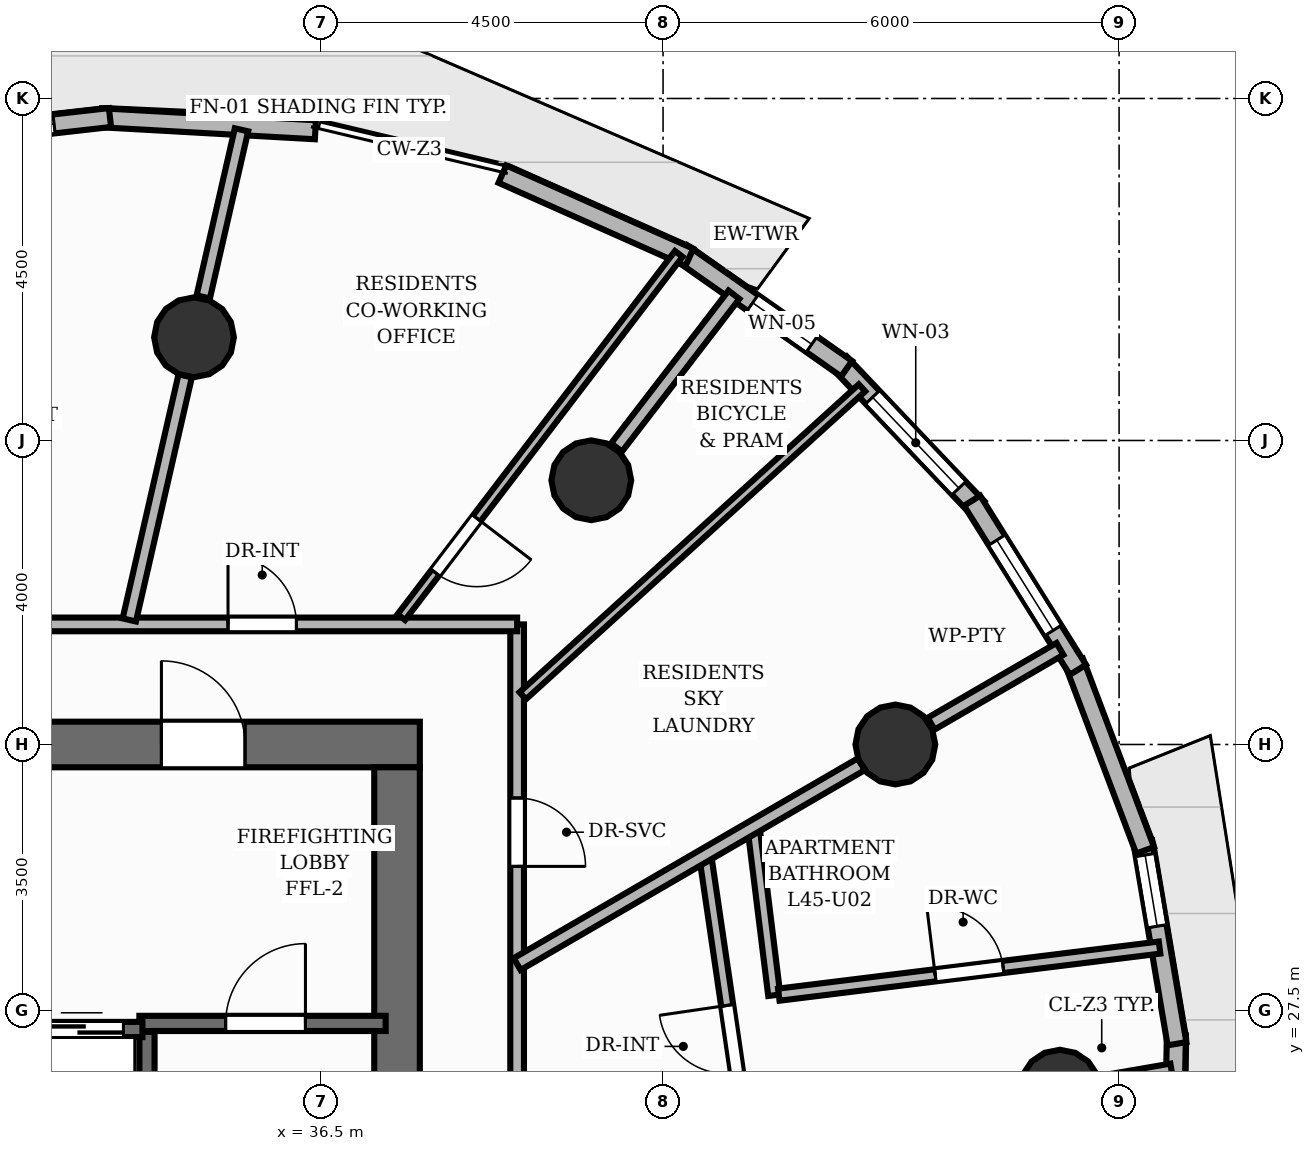
"""IFC4 building model, lengths in metres.
Left out: names, types, materials, properties, quantities, classifications, styles, units other than length and angle.
Written with IfcOpenShell. Run it as: python <this file> out.ifc"""

import sys

from ifc_helpers import new_model, si_unit, direction, frame, frame_2d, origin, origin_2d, place, context, subcontext, project, spatial, rectangle, circle, extrude, element, fill, save


model = new_model("IFC4")
c1 = context("Model", 3, precision=1e-05, world=origin(), true_north=direction((0.0, 1.0)))
c2 = subcontext(c1, "Body", "Model", "MODEL_VIEW")
j1 = project(units=[si_unit("LENGTHUNIT", "METRE"), si_unit("PLANEANGLEUNIT", "RADIAN")], contexts=[c1])
p1 = place(None, origin())
s1 = spatial("IfcSite", under=j1, at=p1, CompositionType="ELEMENT")
p2 = place(p1, origin())
s2 = spatial("IfcBuilding", under=s1, at=p2, CompositionType="ELEMENT")
p3 = place(p2, frame((0.0, 0.0, 152.16)))
s3 = spatial("IfcBuildingStorey", under=s2, at=p3, CompositionType="ELEMENT", Elevation=152.16)
p4 = place(p3, frame((22.7, 31.0, 0.0), z_axis=(0.0, 0.0, 1.0), x_axis=(1.0, 0.0, 0.0)))
e1 = element("IfcWall", 1, at=p4, inside=s3, PredefinedType="SHEAR", context=c2, shape_type="SweptSolid", body=[
    extrude(rectangle(XDim=15.1, YDim=0.6, at=frame_2d((7.55, 0.0))), origin(), (0.0, 0.0, 1.0), 3.2),
])
p5 = place(p4, frame((11.7, 0.0, 0.0)))
e2 = element("IfcOpeningElement", 2, at=p5, cuts=e1, PredefinedType="OPENING", context=c2, shape_type="SweptSolid", body=[
    extrude(rectangle(XDim=1.1, YDim=2.15, at=frame_2d((0.55, 1.075))), frame((0.0, 0.31, 0.0), z_axis=(0.0, -1.0, 0.0), x_axis=(1.0, 0.0, 0.0)), (0.0, 0.0, 1.0), 0.62),
])
p6 = place(p3, frame((37.5, 17.3, 0.0), z_axis=(0.0, 0.0, 1.0), x_axis=(0.0, 1.0, 0.0)))
e3 = element("IfcWall", 3, at=p6, inside=s3, PredefinedType="SHEAR", context=c2, shape_type="SweptSolid", body=[
    extrude(rectangle(XDim=13.4, YDim=0.6, at=frame_2d((6.7, 0.0))), origin(), (0.0, 0.0, 1.0), 3.2),
])
for number, where, z_axis, x_axis in (
    (4, (46.221, 26.458, 0.0), (0.0, 0.0, 1.0), (1.0, 0.0, 0.0)),
    (5, (44.056, 31.0, 0.0), (0.0, 0.0, 1.0), (1.0, 0.0, 0.0)),
    (6, (40.056, 34.477, 0.0), (0.0, 0.0, 1.0), (1.0, 0.0, 0.0)),
    (7, (34.829, 36.358, 0.0), (0.0, 0.0, 1.0), (1.0, 0.0, 0.0)),
):
    element("IfcColumn", number, at=place(p3, frame(where, z_axis=z_axis, x_axis=x_axis)), inside=s3, PredefinedType="COLUMN", context=c2, shape_type="SweptSolid", body=[
        extrude(circle(Radius=0.525, at=origin_2d()), origin(), (0.0, 0.0, 1.0), 3.2),
    ])
p7 = place(p3, frame((43.328, 36.019, 0.0), z_axis=(0.0, 0.0, 1.0), x_axis=(0.688923042016, -0.724834492957, 0.0)))
e8 = element("IfcWall", 8, at=p7, inside=s3, PredefinedType="SOLIDWALL", context=c2, shape_type="SweptSolid", body=[
    extrude(rectangle(XDim=2.624, YDim=0.25, at=frame_2d((1.312, 0.0))), origin(), (0.0, 0.0, 1.0), 2.96),
])
p8 = place(p7, frame((0.621, 0.0, 0.85)))
e9 = element("IfcOpeningElement", 9, at=p8, cuts=e8, PredefinedType="OPENING", context=c2, shape_type="SweptSolid", body=[
    extrude(rectangle(XDim=1.65, YDim=1.55, at=frame_2d((0.825, 0.775))), frame((0.0, 0.135, 0.0), z_axis=(0.0, -1.0, 0.0), x_axis=(1.0, 0.0, 0.0)), (0.0, 0.0, 1.0), 0.27),
])
p9 = place(p3, frame((41.247, 37.466, 0.0), z_axis=(0.0, 0.0, 1.0), x_axis=(0.818434239786, -0.574600204617, 0.0)))
e10 = element("IfcWall", 10, at=p9, inside=s3, PredefinedType="SOLIDWALL", context=c2, shape_type="SweptSolid", body=[
    extrude(rectangle(XDim=2.648, YDim=0.25, at=frame_2d((1.324, 0.0))), origin(), (0.0, 0.0, 1.0), 2.96),
])
p10 = place(p9, frame((1.138, 0.0, 0.85)))
e11 = element("IfcOpeningElement", 11, at=p10, cuts=e10, PredefinedType="OPENING", context=c2, shape_type="SweptSolid", body=[
    extrude(rectangle(XDim=0.95, YDim=1.45, at=frame_2d((0.475, 0.725))), frame((0.0, 0.135, 0.0), z_axis=(0.0, -1.0, 0.0), x_axis=(1.0, 0.0, 0.0)), (0.0, 0.0, 1.0), 0.27),
])
p11 = place(p3, frame((38.886, 38.505, 0.0), z_axis=(0.0, 0.0, 1.0), x_axis=(0.913598321014, -0.406617889228, 0.0)))
e12 = element("IfcWall", 12, at=p11, inside=s3, PredefinedType="SOLIDWALL", context=c2, shape_type="SweptSolid", body=[
    extrude(rectangle(XDim=2.693, YDim=0.25, at=frame_2d((1.346, 0.0))), origin(), (0.0, 0.0, 1.0), 2.96),
])
p12 = place(p3, frame((33.613, 39.246, 0.0), z_axis=(0.0, 0.0, 1.0), x_axis=(0.998436800423, -0.055892356906, 0.0)))
e13 = element("IfcWall", 13, at=p12, inside=s3, PredefinedType="SOLIDWALL", context=c2, shape_type="SweptSolid", body=[
    extrude(rectangle(XDim=2.817, YDim=0.25, at=frame_2d((1.409, 0.0))), origin(), (0.0, 0.0, 1.0), 2.96),
])
p13 = place(p3, frame((30.86, 38.924, 0.0), z_axis=(0.0, 0.0, 1.0), x_axis=(0.993631150985, 0.112681568111, 0.0)))
e14 = element("IfcWall", 14, at=p13, inside=s3, PredefinedType="SOLIDWALL", context=c2, shape_type="SweptSolid", body=[
    extrude(rectangle(XDim=2.882, YDim=0.25, at=frame_2d((1.441, 0.0))), origin(), (0.0, 0.0, 1.0), 2.96),
])
p14 = place(p13, frame((0.741, 0.0, 0.85)))
e15 = element("IfcOpeningElement", 15, at=p14, cuts=e14, PredefinedType="OPENING", context=c2, shape_type="SweptSolid", body=[
    extrude(rectangle(XDim=1.4, YDim=1.55, at=frame_2d((0.7, 0.775))), frame((0.0, 0.135, 0.0), z_axis=(0.0, -1.0, 0.0), x_axis=(1.0, 0.0, 0.0)), (0.0, 0.0, 1.0), 0.27),
])
p15 = place(p3, frame((47.753, 27.175, 0.0), z_axis=(0.0, 0.0, 1.0), x_axis=(-0.018273942119, -0.999833017578, 0.0)))
e16 = element("IfcWall", 16, at=p15, inside=s3, PredefinedType="SOLIDWALL", context=c2, shape_type="SweptSolid", body=[
    extrude(rectangle(XDim=2.752, YDim=0.25, at=frame_2d((1.376, 0.0))), origin(), (0.0, 0.0, 1.0), 2.96),
])
p16 = place(p3, frame((47.313, 29.718, 0.0), z_axis=(0.0, 0.0, 1.0), x_axis=(0.166721354457, -0.9860040517, 0.0)))
e17 = element("IfcWall", 17, at=p16, inside=s3, PredefinedType="SOLIDWALL", context=c2, shape_type="SweptSolid", body=[
    extrude(rectangle(XDim=2.693, YDim=0.25, at=frame_2d((1.346, 0.0))), origin(), (0.0, 0.0, 1.0), 2.96),
])
p17 = place(p16, frame((0.175, 0.0, 0.85)))
e18 = element("IfcOpeningElement", 18, at=p17, cuts=e17, PredefinedType="OPENING", context=c2, shape_type="SweptSolid", body=[
    extrude(rectangle(XDim=0.95, YDim=1.45, at=frame_2d((0.475, 0.725))), frame((0.0, 0.135, 0.0), z_axis=(0.0, -1.0, 0.0), x_axis=(1.0, 0.0, 0.0)), (0.0, 0.0, 1.0), 0.27),
])
p18 = place(p3, frame((46.408, 32.086, 0.0), z_axis=(0.0, 0.0, 1.0), x_axis=(0.353022229402, -0.93561493444, 0.0)))
e19 = element("IfcWall", 19, at=p18, inside=s3, PredefinedType="SOLIDWALL", context=c2, shape_type="SweptSolid", body=[
    extrude(rectangle(XDim=2.648, YDim=0.25, at=frame_2d((1.324, 0.0))), origin(), (0.0, 0.0, 1.0), 2.96),
])
p19 = place(p3, frame((45.066, 34.207, 0.0), z_axis=(0.0, 0.0, 1.0), x_axis=(0.530726374543, -0.847543223302, 0.0)))
e20 = element("IfcWall", 20, at=p19, inside=s3, PredefinedType="SOLIDWALL", context=c2, shape_type="SweptSolid", body=[
    extrude(rectangle(XDim=2.624, YDim=0.25, at=frame_2d((1.312, 0.0))), origin(), (0.0, 0.0, 1.0), 2.96),
])
p20 = place(p19, frame((0.612, 0.0, 0.85)))
e21 = element("IfcOpeningElement", 21, at=p20, cuts=e20, PredefinedType="OPENING", context=c2, shape_type="SweptSolid", body=[
    extrude(rectangle(XDim=1.4, YDim=1.45, at=frame_2d((0.7, 0.725))), frame((0.0, 0.135, 0.0), z_axis=(0.0, -1.0, 0.0), x_axis=(1.0, 0.0, 0.0)), (0.0, 0.0, 1.0), 0.27),
])
p21 = place(p3, frame((34.21, 20.78, 0.0), z_axis=(0.0, 0.0, 1.0), x_axis=(0.0, 1.0, 0.0)))
e22 = element("IfcWall", 22, at=p21, inside=s3, PredefinedType="SHEAR", context=c2, shape_type="SweptSolid", body=[
    extrude(rectangle(XDim=6.44, YDim=0.2, at=frame_2d((3.22, 0.0))), origin(), (0.0, 0.0, 1.0), 3.2),
])
p22 = place(p3, frame((34.11, 27.33, 0.0), z_axis=(0.0, 0.0, 1.0), x_axis=(1.0, 0.0, 0.0)))
e23 = element("IfcWall", 23, at=p22, inside=s3, PredefinedType="SHEAR", context=c2, shape_type="SweptSolid", body=[
    extrude(rectangle(XDim=3.24, YDim=0.2, at=frame_2d((1.62, 0.0))), origin(), (0.0, 0.0, 1.0), 3.2),
])
p23 = place(p22, frame((1.135, 0.0, 0.0)))
e24 = element("IfcOpeningElement", 24, at=p23, cuts=e23, PredefinedType="OPENING", context=c2, shape_type="SweptSolid", body=[
    extrude(rectangle(XDim=1.05, YDim=2.15, at=frame_2d((0.525, 1.075))), frame((0.0, 0.11, 0.0), z_axis=(0.0, -1.0, 0.0), x_axis=(1.0, 0.0, 0.0)), (0.0, 0.0, 1.0), 0.22),
])
p24 = place(p3, frame((31.85, 27.25, 0.0), z_axis=(0.0, 0.0, 1.0), x_axis=(1.0, 0.0, 0.0)))
e25 = element("IfcWall", 25, at=p24, inside=s3, PredefinedType="SHEAR", context=c2, shape_type="SweptSolid", body=[
    extrude(rectangle(XDim=2.3, YDim=0.2, at=frame_2d((1.15, 0.0))), origin(), (0.0, 0.0, 1.0), 3.2),
])
p25 = place(p24, frame((0.95, 0.0, 0.0)))
e26 = element("IfcOpeningElement", 26, at=p25, cuts=e25, PredefinedType="OPENING", context=c2, shape_type="SweptSolid", body=[
    extrude(rectangle(XDim=1.1, YDim=2.15, at=frame_2d((0.55, 1.075))), frame((0.0, 0.11, 0.0), z_axis=(0.0, -1.0, 0.0), x_axis=(1.0, 0.0, 0.0)), (0.0, 0.0, 1.0), 0.22),
])
p26 = place(p3, frame((46.758, 26.551, 0.0), z_axis=(0.0, 0.0, 1.0), x_axis=(0.985363023372, 0.170469094476, 0.0)))
e27 = element("IfcWall", 27, at=p26, inside=s3, PredefinedType="PARTITIONING", context=c2, shape_type="SweptSolid", body=[
    extrude(rectangle(XDim=0.945, YDim=0.18, at=frame_2d((0.473, 0.0))), origin(), (0.0, 0.0, 1.0), 2.336),
])
p27 = place(p3, frame((44.528, 31.274, 0.0), z_axis=(0.0, 0.0, 1.0), x_axis=(0.864794183852, 0.502126497584, 0.0)))
e28 = element("IfcWall", 28, at=p27, inside=s3, PredefinedType="PARTITIONING", context=c2, shape_type="SweptSolid", body=[
    extrude(rectangle(XDim=1.959, YDim=0.18, at=frame_2d((0.979, 0.0))), origin(), (0.0, 0.0, 1.0), 2.336),
])
p28 = place(p3, frame((40.388, 34.908, 0.0), z_axis=(0.0, 0.0, 1.0), x_axis=(0.609529171404, 0.79276364019, 0.0)))
e29 = element("IfcWall", 29, at=p28, inside=s3, PredefinedType="PARTITIONING", context=c2, shape_type="SweptSolid", body=[
    extrude(rectangle(XDim=2.534, YDim=0.18, at=frame_2d((1.267, 0.0))), origin(), (0.0, 0.0, 1.0), 2.336),
])
p29 = place(p3, frame((34.95, 36.889, 0.0), z_axis=(0.0, 0.0, 1.0), x_axis=(0.223104026265, 0.974794641688, 0.0)))
e30 = element("IfcWall", 30, at=p29, inside=s3, PredefinedType="PARTITIONING", context=c2, shape_type="SweptSolid", body=[
    extrude(rectangle(XDim=2.255, YDim=0.18, at=frame_2d((1.128, 0.0))), origin(), (0.0, 0.0, 1.0), 2.336),
])
p30 = place(p3, frame((39.08, 32.58, 0.0), z_axis=(0.0, 0.0, 1.0), x_axis=(0.0, -1.0, 0.0)))
e31 = element("IfcWall", 31, at=p30, inside=s3, PredefinedType="PARTITIONING", context=c2, shape_type="SweptSolid", body=[
    extrude(rectangle(XDim=17.16, YDim=0.18, at=frame_2d((8.58, 0.0))), origin(), (0.0, 0.0, 1.0), 2.955),
])
p31 = place(p30, frame((8.667, 0.0, 0.0)))
e32 = element("IfcOpeningElement", 32, at=p31, cuts=e31, PredefinedType="OPENING", context=c2, shape_type="SweptSolid", body=[
    extrude(rectangle(XDim=1.05, YDim=2.15, at=frame_2d((0.525, 1.075))), frame((0.0, 0.1, 0.0), z_axis=(0.0, -1.0, 0.0), x_axis=(1.0, 0.0, 0.0)), (0.0, 0.0, 1.0), 0.2),
])
p32 = place(p30, frame((2.284, 0.0, 0.0)))
e33 = element("IfcOpeningElement", 33, at=p32, cuts=e31, PredefinedType="OPENING", context=c2, shape_type="SweptSolid", body=[
    extrude(rectangle(XDim=0.9, YDim=2.1, at=frame_2d((0.45, 1.05))), frame((0.0, 0.1, 0.0), z_axis=(0.0, -1.0, 0.0), x_axis=(1.0, 0.0, 0.0)), (0.0, 0.0, 1.0), 0.2),
])
p33 = place(p3, frame((29.544, 32.58, 0.0), z_axis=(0.0, 0.0, 1.0), x_axis=(1.0, 0.0, 0.0)))
e34 = element("IfcWall", 34, at=p33, inside=s3, PredefinedType="PARTITIONING", context=c2, shape_type="SweptSolid", body=[
    extrude(rectangle(XDim=9.536, YDim=0.18, at=frame_2d((4.768, 0.0))), origin(), (0.0, 0.0, 1.0), 2.955),
])
p34 = place(p33, frame((5.733, 0.0, 0.0)))
e35 = element("IfcOpeningElement", 35, at=p34, cuts=e34, PredefinedType="OPENING", context=c2, shape_type="SweptSolid", body=[
    extrude(rectangle(XDim=0.9, YDim=2.1, at=frame_2d((0.45, 1.05))), frame((0.0, 0.1, 0.0), z_axis=(0.0, -1.0, 0.0), x_axis=(1.0, 0.0, 0.0)), (0.0, 0.0, 1.0), 0.2),
])
p35 = place(p3, frame((42.189, 29.916, 0.0), z_axis=(0.0, 0.0, 1.0), x_axis=(0.122809822633, -0.99243022297, 0.0)))
e36 = element("IfcWall", 36, at=p35, inside=s3, PredefinedType="PLUMBINGWALL", context=c2, shape_type="SweptSolid", body=[
    extrude(rectangle(XDim=2.232, YDim=0.16, at=frame_2d((1.116, 0.0))), origin(), (0.0, 0.0, 1.0), 2.955),
])
p36 = place(p3, frame((42.523, 27.708, 0.0), z_axis=(0.0, 0.0, 1.0), x_axis=(0.992432598709, 0.122790622685, 0.0)))
e37 = element("IfcWall", 37, at=p36, inside=s3, PredefinedType="PLUMBINGWALL", context=c2, shape_type="SweptSolid", body=[
    extrude(rectangle(XDim=5.048, YDim=0.16, at=frame_2d((2.524, 0.0))), origin(), (0.0, 0.0, 1.0), 2.692),
])
p37 = place(p36, frame((2.074, 0.0, 0.0)))
e38 = element("IfcOpeningElement", 38, at=p37, cuts=e37, PredefinedType="OPENING", context=c2, shape_type="SweptSolid", body=[
    extrude(rectangle(XDim=0.9, YDim=2.1, at=frame_2d((0.45, 1.05))), frame((0.0, 0.09, 0.0), z_axis=(0.0, -1.0, 0.0), x_axis=(1.0, 0.0, 0.0)), (0.0, 0.0, 1.0), 0.18),
])
p38 = place(p3, frame((42.184, 25.251, 0.0), z_axis=(0.0, 0.0, 1.0), x_axis=(-0.145293261483, 0.989388633535, 0.0)))
e39 = element("IfcWall", 39, at=p38, inside=s3, PredefinedType="PLUMBINGWALL", context=c2, shape_type="SweptSolid", body=[
    extrude(rectangle(XDim=4.342, YDim=0.16, at=frame_2d((2.171, 0.0))), origin(), (0.0, 0.0, 1.0), 2.955),
])
p39 = place(p38, frame((1.441, 0.0, 0.0)))
e40 = element("IfcOpeningElement", 40, at=p39, cuts=e39, PredefinedType="OPENING", context=c2, shape_type="SweptSolid", body=[
    extrude(rectangle(XDim=0.9, YDim=2.1, at=frame_2d((0.45, 1.05))), frame((0.0, 0.09, 0.0), z_axis=(0.0, -1.0, 0.0), x_axis=(1.0, 0.0, 0.0)), (0.0, 0.0, 1.0), 0.18),
])
p40 = place(p3, frame((39.08, 28.111, 0.0), z_axis=(0.0, 0.0, 1.0), x_axis=(0.864768049288, 0.502171505495, 0.0)))
e41 = element("IfcWall", 41, at=p40, inside=s3, PredefinedType="PARTITIONING", context=c2, shape_type="SweptSolid", body=[
    extrude(rectangle(XDim=5.237, YDim=0.18, at=frame_2d((2.619, 0.0))), origin(), (0.0, 0.0, 1.0), 2.336),
])
p41 = place(p3, frame((41.207, 37.455, 0.0), z_axis=(0.0, 0.0, 1.0), x_axis=(-0.606958821331, -0.794733281805, 0.0)))
e42 = element("IfcWall", 42, at=p41, inside=s3, PredefinedType="PARTITIONING", context=c2, shape_type="SweptSolid", body=[
    extrude(rectangle(XDim=6.015, YDim=0.125, at=frame_2d((3.007, 0.0))), origin(), (0.0, 0.0, 1.0), 2.955),
])
p42 = place(p41, frame((4.377, 0.0, 0.0)))
e43 = element("IfcOpeningElement", 43, at=p42, cuts=e42, PredefinedType="OPENING", context=c2, shape_type="SweptSolid", body=[
    extrude(rectangle(XDim=0.9, YDim=2.1, at=frame_2d((0.45, 1.05))), frame((0.0, 0.073, 0.0), z_axis=(0.0, -1.0, 0.0), x_axis=(1.0, 0.0, 0.0)), (0.0, 0.0, 1.0), 0.145),
])
p43 = place(p3, frame((33.977, 32.638, 0.0), z_axis=(0.0, 0.0, 1.0), x_axis=(0.22319287001, 0.974774303506, 0.0)))
e44 = element("IfcWall", 44, at=p43, inside=s3, PredefinedType="PARTITIONING", context=c2, shape_type="SweptSolid", body=[
    extrude(rectangle(XDim=3.296, YDim=0.18, at=frame_2d((1.648, 0.0))), origin(), (0.0, 0.0, 1.0), 2.336),
])
p44 = place(p3, frame((39.154, 31.641, 0.0), z_axis=(0.0, 0.0, 1.0), x_axis=(0.740463996849, 0.672096026896, 0.0)))
e45 = element("IfcWall", 45, at=p44, inside=s3, PredefinedType="PARTITIONING", context=c2, shape_type="SweptSolid", body=[
    extrude(rectangle(XDim=6.028, YDim=0.125, at=frame_2d((3.014, 0.0))), origin(), (0.0, 0.0, 1.0), 2.955),
])
p45 = place(p8, origin())
e46 = element("IfcWindow", 46, at=p45, inside=s3, PartitioningType="SINGLE_PANEL", PredefinedType="WINDOW", context=c2, shape_type="SweptSolid", body=[
    extrude(rectangle(XDim=1.65, YDim=1.55, at=frame_2d((0.825, 0.775))), frame((0.0, 0.03, 0.0), z_axis=(0.0, -1.0, 0.0), x_axis=(1.0, 0.0, 0.0)), (0.0, 0.0, 1.0), 0.06),
])
fill(e9, e46)
p46 = place(p10, origin())
e47 = element("IfcWindow", 47, at=p46, inside=s3, PartitioningType="SINGLE_PANEL", PredefinedType="WINDOW", context=c2, shape_type="SweptSolid", body=[
    extrude(rectangle(XDim=0.95, YDim=1.45, at=frame_2d((0.475, 0.725))), frame((0.0, 0.03, 0.0), z_axis=(0.0, -1.0, 0.0), x_axis=(1.0, 0.0, 0.0)), (0.0, 0.0, 1.0), 0.06),
])
fill(e11, e47)
p47 = place(p14, origin())
e48 = element("IfcWindow", 48, at=p47, inside=s3, PartitioningType="SINGLE_PANEL", PredefinedType="WINDOW", context=c2, shape_type="SweptSolid", body=[
    extrude(rectangle(XDim=1.4, YDim=1.55, at=frame_2d((0.7, 0.775))), frame((0.0, 0.03, 0.0), z_axis=(0.0, -1.0, 0.0), x_axis=(1.0, 0.0, 0.0)), (0.0, 0.0, 1.0), 0.06),
])
fill(e15, e48)
p48 = place(p17, origin())
e49 = element("IfcWindow", 49, at=p48, inside=s3, PartitioningType="SINGLE_PANEL", PredefinedType="WINDOW", context=c2, shape_type="SweptSolid", body=[
    extrude(rectangle(XDim=0.95, YDim=1.45, at=frame_2d((0.475, 0.725))), frame((0.0, 0.03, 0.0), z_axis=(0.0, -1.0, 0.0), x_axis=(1.0, 0.0, 0.0)), (0.0, 0.0, 1.0), 0.06),
])
fill(e18, e49)
p49 = place(p20, origin())
e50 = element("IfcWindow", 50, at=p49, inside=s3, PartitioningType="SINGLE_PANEL", PredefinedType="WINDOW", context=c2, shape_type="SweptSolid", body=[
    extrude(rectangle(XDim=1.4, YDim=1.45, at=frame_2d((0.7, 0.725))), frame((0.0, 0.03, 0.0), z_axis=(0.0, -1.0, 0.0), x_axis=(1.0, 0.0, 0.0)), (0.0, 0.0, 1.0), 0.06),
])
fill(e21, e50)
p50 = place(p23, origin())
e51 = element("IfcDoor", 51, at=p50, inside=s3, OperationType="SINGLE_SWING_RIGHT", PredefinedType="DOOR", context=c2, shape_type="SweptSolid", body=[
    extrude(rectangle(XDim=1.05, YDim=2.15, at=frame_2d((0.525, 1.075))), frame((0.0, 0.025, 0.0), z_axis=(0.0, -1.0, 0.0), x_axis=(1.0, 0.0, 0.0)), (0.0, 0.0, 1.0), 0.05),
])
fill(e24, e51)
p51 = place(p5, origin())
e52 = element("IfcDoor", 52, at=p51, inside=s3, OperationType="SINGLE_SWING_LEFT", PredefinedType="DOOR", context=c2, shape_type="SweptSolid", body=[
    extrude(rectangle(XDim=1.1, YDim=2.15, at=frame_2d((0.55, 1.075))), frame((0.0, 0.025, 0.0), z_axis=(0.0, -1.0, 0.0), x_axis=(1.0, 0.0, 0.0)), (0.0, 0.0, 1.0), 0.05),
])
fill(e2, e52)
p52 = place(p25, origin())
e53 = element("IfcDoor", 53, at=p52, inside=s3, OperationType="DOUBLE_DOOR_SLIDING", PredefinedType="DOOR", context=c2, shape_type="SweptSolid", body=[
    extrude(rectangle(XDim=1.1, YDim=2.15, at=frame_2d((0.55, 1.075))), frame((0.0, 0.025, 0.0), z_axis=(0.0, -1.0, 0.0), x_axis=(1.0, 0.0, 0.0)), (0.0, 0.0, 1.0), 0.05),
])
fill(e26, e53)
p53 = place(p37, origin())
e54 = element("IfcDoor", 54, at=p53, inside=s3, OperationType="SINGLE_SWING_LEFT", PredefinedType="DOOR", context=c2, shape_type="SweptSolid", body=[
    extrude(rectangle(XDim=0.9, YDim=2.1, at=frame_2d((0.45, 1.05))), frame((0.0, 0.025, 0.0), z_axis=(0.0, -1.0, 0.0), x_axis=(1.0, 0.0, 0.0)), (0.0, 0.0, 1.0), 0.05),
])
fill(e38, e54)
p54 = place(p39, origin())
e55 = element("IfcDoor", 55, at=p54, inside=s3, OperationType="SINGLE_SWING_RIGHT", PredefinedType="DOOR", context=c2, shape_type="SweptSolid", body=[
    extrude(rectangle(XDim=0.9, YDim=2.1, at=frame_2d((0.45, 1.05))), frame((0.0, 0.025, 0.0), z_axis=(0.0, -1.0, 0.0), x_axis=(1.0, 0.0, 0.0)), (0.0, 0.0, 1.0), 0.05),
])
fill(e40, e55)
p55 = place(p34, origin())
e56 = element("IfcDoor", 56, at=p55, inside=s3, OperationType="SINGLE_SWING_LEFT", PredefinedType="DOOR", context=c2, shape_type="SweptSolid", body=[
    extrude(rectangle(XDim=0.9, YDim=2.1, at=frame_2d((0.45, 1.05))), frame((0.0, 0.025, 0.0), z_axis=(0.0, -1.0, 0.0), x_axis=(1.0, 0.0, 0.0)), (0.0, 0.0, 1.0), 0.05),
])
fill(e35, e56)
p56 = place(p32, origin())
e57 = element("IfcDoor", 57, at=p56, inside=s3, OperationType="SINGLE_SWING_RIGHT", PredefinedType="DOOR", context=c2, shape_type="SweptSolid", body=[
    extrude(rectangle(XDim=0.9, YDim=2.1, at=frame_2d((0.45, 1.05))), frame((0.0, 0.025, 0.0), z_axis=(0.0, -1.0, 0.0), x_axis=(1.0, 0.0, 0.0)), (0.0, 0.0, 1.0), 0.05),
])
fill(e33, e57)
p57 = place(p42, origin())
e58 = element("IfcDoor", 58, at=p57, inside=s3, OperationType="SINGLE_SWING_LEFT", PredefinedType="DOOR", context=c2, shape_type="SweptSolid", body=[
    extrude(rectangle(XDim=0.9, YDim=2.1, at=frame_2d((0.45, 1.05))), frame((0.0, 0.025, 0.0), z_axis=(0.0, -1.0, 0.0), x_axis=(1.0, 0.0, 0.0)), (0.0, 0.0, 1.0), 0.05),
])
fill(e43, e58)
save(model, sys.argv[1])
